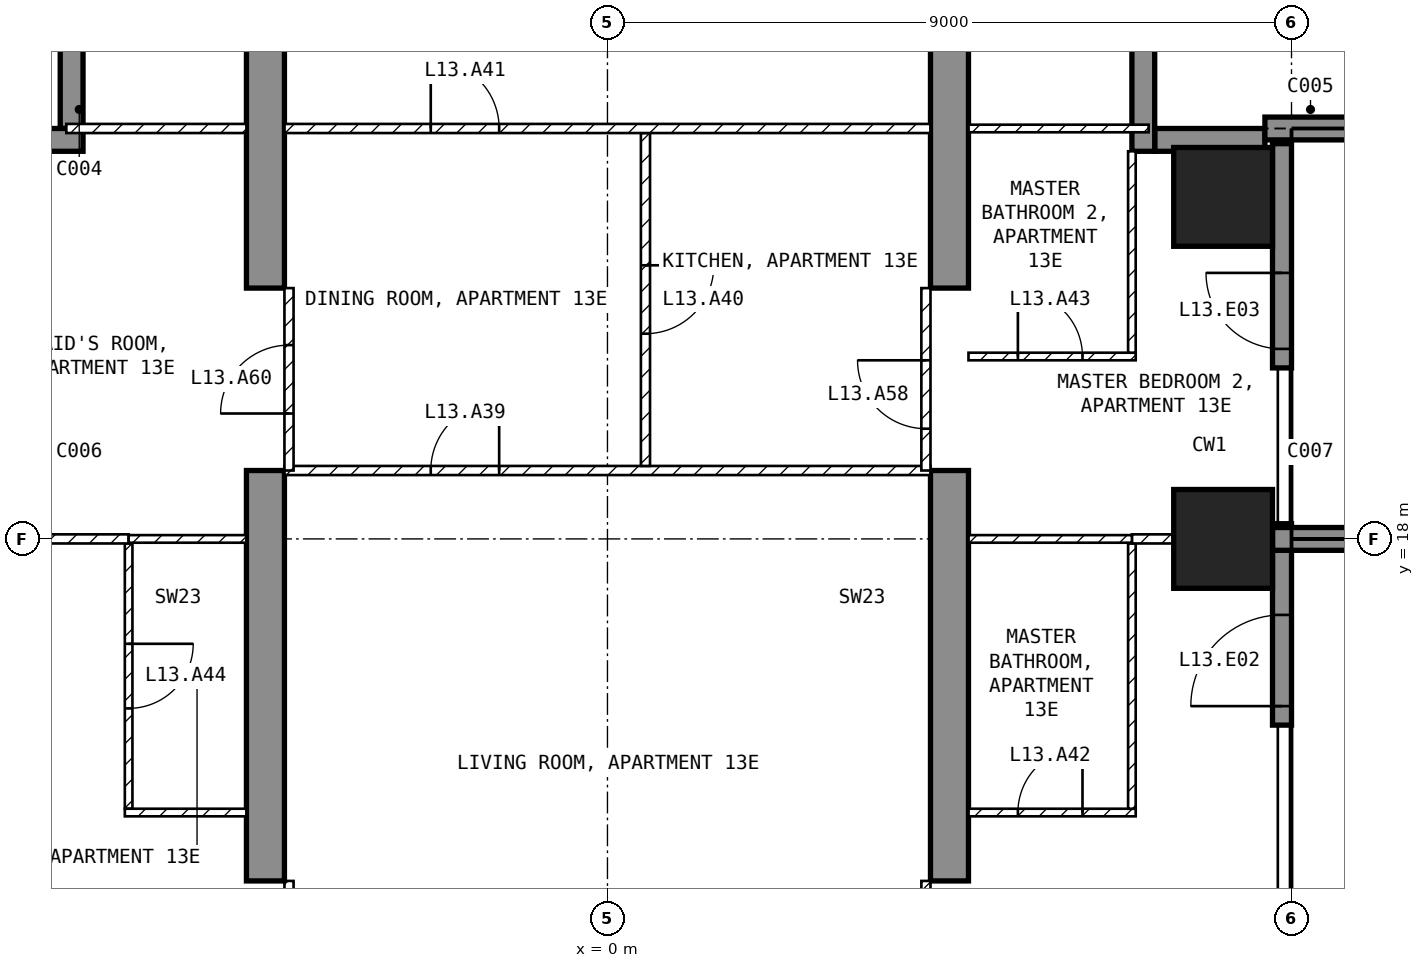
"""IFC4 building model, lengths in metres.
Left out: names, types, materials, properties, quantities, classifications, styles, units other than length and angle.
Written with IfcOpenShell. Run it as: python <this file> out.ifc"""

import sys

from ifc_helpers import new_model, si_unit, direction, frame, frame_2d, origin, origin_2d, place, context, subcontext, project, spatial, polyline, rectangle, outline, extrude, element, fill, save


model = new_model("IFC4")
c1 = context("Model", 3, precision=1e-05, world=origin(), true_north=direction((0.0, 1.0)))
c2 = subcontext(c1, "Body", "Model", "MODEL_VIEW")
j1 = project(units=[si_unit("LENGTHUNIT", "METRE"), si_unit("PLANEANGLEUNIT", "RADIAN")], contexts=[c1])
p1 = place(None, origin())
s1 = spatial("IfcSite", under=j1, at=p1, CompositionType="ELEMENT")
p2 = place(p1, origin())
s2 = spatial("IfcBuilding", under=s1, at=p2, CompositionType="ELEMENT")
p3 = place(p2, frame((0.0, 0.0, 64.5)))
s3 = spatial("IfcBuildingStorey", under=s2, at=p3, CompositionType="ELEMENT", Elevation=64.5)
for number, where, z_axis, x_axis in (
    (1, (8.1, 18.0, -0.25), (0.0, 0.0, 1.0), (1.0, 0.0, 0.0)),
    (2, (8.1, 22.5, -0.25), (0.0, 0.0, 1.0), (1.0, 0.0, 0.0)),
):
    element("IfcColumn", number, at=place(p3, frame(where, z_axis=z_axis, x_axis=x_axis)), inside=s3, PredefinedType="COLUMN", context=c2, shape_type="SweptSolid", body=[
        extrude(rectangle(XDim=1.3, YDim=1.3, at=origin_2d()), origin(), (0.0, 0.0, 1.0), 3.5),
    ])
for number, where, z_axis, x_axis in (
    (3, (-4.75, 9.0, -0.25), (1.0, 0.0, 0.0), (0.0, 1.0, 0.0)),
    (4, (4.25, 9.0, -0.25), (1.0, 0.0, 0.0), (0.0, 1.0, 0.0)),
):
    element("IfcWall", number, at=place(p3, frame(where, z_axis=z_axis, x_axis=x_axis)), inside=s3, PredefinedType="SHEAR", context=c2, shape_type="SweptSolid", body=[
        extrude(outline(polyline([(0.0, 0.0), (2.1, 0.0), (2.1, 2.65), (4.5, 2.65), (4.5, 0.0), (9.9, 0.0), (9.9, 2.65), (12.3, 2.65), (12.3, 0.0), (16.45, 0.0), (16.45, 3.5), (0.0, 3.5), (0.0, 0.0)])), origin(), (0.0, 0.0, 1.0), 0.5),
    ])
p4 = place(p3, frame((8.875, 15.55, 0.0), z_axis=(0.0, 0.0, 1.0), x_axis=(0.0, 1.0, 0.0)))
e5 = element("IfcWall", 5, at=p4, inside=s3, PredefinedType="SOLIDWALL", context=c2, shape_type="SweptSolid", body=[
    extrude(rectangle(XDim=2.65, YDim=0.25, at=frame_2d((1.325, 0.0))), origin(), (0.0, 0.0, 1.0), 3.25),
])
p5 = place(p4, frame((0.25, 0.0, 0.0)))
e6 = element("IfcOpeningElement", 6, at=p5, cuts=e5, PredefinedType="OPENING", context=c2, shape_type="SweptSolid", body=[
    extrude(rectangle(XDim=1.2, YDim=2.4, at=frame_2d((0.6, 1.2))), frame((0.0, 0.135, 0.0), z_axis=(0.0, -1.0, 0.0), x_axis=(1.0, 0.0, 0.0)), (0.0, 0.0, 1.0), 0.27),
])
p6 = place(p3, frame((8.875, 20.25, 0.0), z_axis=(0.0, 0.0, 1.0), x_axis=(0.0, 1.0, 0.0)))
e7 = element("IfcWall", 7, at=p6, inside=s3, PredefinedType="SOLIDWALL", context=c2, shape_type="SweptSolid", body=[
    extrude(rectangle(XDim=2.95, YDim=0.25, at=frame_2d((1.475, 0.0))), origin(), (0.0, 0.0, 1.0), 3.25),
])
p7 = place(p6, frame((0.25, 0.0, 0.0)))
e8 = element("IfcOpeningElement", 8, at=p7, cuts=e7, PredefinedType="OPENING", context=c2, shape_type="SweptSolid", body=[
    extrude(rectangle(XDim=1.0, YDim=2.4, at=frame_2d((0.5, 1.2))), frame((0.0, 0.135, 0.0), z_axis=(0.0, -1.0, 0.0), x_axis=(1.0, 0.0, 0.0)), (0.0, 0.0, 1.0), 0.27),
])
p8 = place(p3, frame((8.65, 23.25, 0.0), z_axis=(0.0, 0.0, 1.0), x_axis=(-1.0, 0.0, 0.0)))
e9 = element("IfcWall", 9, at=p8, inside=s3, PredefinedType="SOLIDWALL", context=c2, shape_type="SweptSolid", body=[
    extrude(rectangle(XDim=1.45, YDim=0.3, at=frame_2d((0.725, 0.0))), origin(), (0.0, 0.0, 1.0), 3.25),
])
p9 = place(p3, frame((7.05, 23.1, 0.0), z_axis=(0.0, 0.0, 1.0), x_axis=(0.0, 1.0, 0.0)))
e10 = element("IfcWall", 10, at=p9, inside=s3, PredefinedType="SOLIDWALL", context=c2, shape_type="SweptSolid", body=[
    extrude(rectangle(XDim=1.8, YDim=0.3, at=frame_2d((0.9, 0.0))), origin(), (0.0, 0.0, 1.0), 3.25),
])
p10 = place(p3, frame((-7.05, 25.2, 0.0), z_axis=(0.0, 0.0, 1.0), x_axis=(0.0, -1.0, 0.0)))
e11 = element("IfcWall", 11, at=p10, inside=s3, PredefinedType="SOLIDWALL", context=c2, shape_type="SweptSolid", body=[
    extrude(rectangle(XDim=1.8, YDim=0.3, at=frame_2d((0.9, 0.0))), origin(), (0.0, 0.0, 1.0), 3.25),
])
p11 = place(p3, frame((-6.9, 23.25, 0.0), z_axis=(0.0, 0.0, 1.0), x_axis=(-1.0, 0.0, 0.0)))
e12 = element("IfcWall", 12, at=p11, inside=s3, PredefinedType="SOLIDWALL", context=c2, shape_type="SweptSolid", body=[
    extrude(rectangle(XDim=1.75, YDim=0.3, at=frame_2d((0.875, 0.0))), origin(), (0.0, 0.0, 1.0), 3.25),
])
p12 = place(p3, frame((8.75, 18.0, 0.0), z_axis=(0.0, 0.0, 1.0), x_axis=(1.0, 0.0, 0.0)))
e13 = element("IfcWall", 13, at=p12, inside=s3, PredefinedType="SOLIDWALL", context=c2, shape_type="SweptSolid", body=[
    extrude(rectangle(XDim=2.95, YDim=0.3, at=frame_2d((1.475, 0.0))), origin(), (0.0, 0.0, 1.0), 3.25),
])
p13 = place(p3, frame((8.65, 23.4, 0.0), z_axis=(0.0, 0.0, 1.0), x_axis=(1.0, 0.0, 0.0)))
e14 = element("IfcWall", 14, at=p13, inside=s3, PredefinedType="SOLIDWALL", context=c2, shape_type="SweptSolid", body=[
    extrude(rectangle(XDim=3.05, YDim=0.3, at=frame_2d((1.525, 0.0))), origin(), (0.0, 0.0, 1.0), 3.25),
])
p14 = place(p3, frame((-4.25, 18.9, 0.0), z_axis=(0.0, 0.0, 1.0), x_axis=(1.0, 0.0, 0.0)))
e15 = element("IfcWall", 15, at=p14, inside=s3, PredefinedType="PARTITIONING", context=c2, shape_type="SweptSolid", body=[
    extrude(rectangle(XDim=8.5, YDim=0.12, at=frame_2d((4.25, 0.0))), origin(), (0.0, 0.0, 1.0), 3.25),
])
p15 = place(p14, frame((1.925, 0.0, 0.0)))
e16 = element("IfcOpeningElement", 16, at=p15, cuts=e15, PredefinedType="OPENING", context=c2, shape_type="SweptSolid", body=[
    extrude(rectangle(XDim=0.9, YDim=2.1, at=frame_2d((0.45, 1.05))), frame((0.0, 0.07, 0.0), z_axis=(0.0, -1.0, 0.0), x_axis=(1.0, 0.0, 0.0)), (0.0, 0.0, 1.0), 0.14),
])
p16 = place(p3, frame((0.5, 23.34, 0.0), z_axis=(0.0, 0.0, 1.0), x_axis=(0.0, -1.0, 0.0)))
e17 = element("IfcWall", 17, at=p16, inside=s3, PredefinedType="PARTITIONING", context=c2, shape_type="SweptSolid", body=[
    extrude(rectangle(XDim=4.38, YDim=0.12, at=frame_2d((2.19, 0.0))), origin(), (0.0, 0.0, 1.0), 3.25),
])
p17 = place(p16, frame((1.74, 0.0, 0.0)))
e18 = element("IfcOpeningElement", 18, at=p17, cuts=e17, PredefinedType="OPENING", context=c2, shape_type="SweptSolid", body=[
    extrude(rectangle(XDim=0.9, YDim=2.1, at=frame_2d((0.45, 1.05))), frame((0.0, 0.07, 0.0), z_axis=(0.0, -1.0, 0.0), x_axis=(1.0, 0.0, 0.0)), (0.0, 0.0, 1.0), 0.14),
])
p18 = place(p3, frame((-4.25, 23.4, 0.0), z_axis=(0.0, 0.0, 1.0), x_axis=(1.0, 0.0, 0.0)))
e19 = element("IfcWall", 19, at=p18, inside=s3, PredefinedType="PARTITIONING", context=c2, shape_type="SweptSolid", body=[
    extrude(rectangle(XDim=8.5, YDim=0.12, at=frame_2d((4.25, 0.0))), origin(), (0.0, 0.0, 1.0), 3.25),
])
p19 = place(p18, frame((1.925, 0.0, 0.0)))
e20 = element("IfcOpeningElement", 20, at=p19, cuts=e19, PredefinedType="OPENING", context=c2, shape_type="SweptSolid", body=[
    extrude(rectangle(XDim=0.9, YDim=2.1, at=frame_2d((0.45, 1.05))), frame((0.0, 0.07, 0.0), z_axis=(0.0, -1.0, 0.0), x_axis=(1.0, 0.0, 0.0)), (0.0, 0.0, 1.0), 0.14),
])
p20 = place(p3, frame((4.75, 14.4, 0.0), z_axis=(0.0, 0.0, 1.0), x_axis=(1.0, 0.0, 0.0)))
e21 = element("IfcWall", 21, at=p20, inside=s3, PredefinedType="PARTITIONING", context=c2, shape_type="SweptSolid", body=[
    extrude(rectangle(XDim=2.2, YDim=0.1, at=frame_2d((1.1, 0.0))), origin(), (0.0, 0.0, 1.0), 3.25),
])
p21 = place(p20, frame((0.65, 0.0, 0.0)))
e22 = element("IfcOpeningElement", 22, at=p21, cuts=e21, PredefinedType="OPENING", context=c2, shape_type="SweptSolid", body=[
    extrude(rectangle(XDim=0.85, YDim=2.1, at=frame_2d((0.425, 1.05))), frame((0.0, 0.06, 0.0), z_axis=(0.0, -1.0, 0.0), x_axis=(1.0, 0.0, 0.0)), (0.0, 0.0, 1.0), 0.12),
])
p22 = place(p3, frame((6.9, 14.45, 0.0), z_axis=(0.0, 0.0, 1.0), x_axis=(0.0, 1.0, 0.0)))
e23 = element("IfcWall", 23, at=p22, inside=s3, PredefinedType="PARTITIONING", context=c2, shape_type="SweptSolid", body=[
    extrude(rectangle(XDim=3.49, YDim=0.1, at=frame_2d((1.745, 0.0))), origin(), (0.0, 0.0, 1.0), 3.25),
])
p23 = place(p3, frame((6.9, 18.0, 0.0), z_axis=(0.0, 0.0, 1.0), x_axis=(1.0, 0.0, 0.0)))
e24 = element("IfcWall", 24, at=p23, inside=s3, PredefinedType="PARTITIONING", context=c2, shape_type="SweptSolid", body=[
    extrude(rectangle(XDim=0.55, YDim=0.12, at=frame_2d((0.275, 0.0))), origin(), (0.0, 0.0, 1.0), 2.346),
])
p24 = place(p3, frame((4.75, 18.0, 0.0), z_axis=(0.0, 0.0, 1.0), x_axis=(1.0, 0.0, 0.0)))
e25 = element("IfcWall", 25, at=p24, inside=s3, PredefinedType="PARTITIONING", context=c2, shape_type="SweptSolid", body=[
    extrude(rectangle(XDim=2.15, YDim=0.1, at=frame_2d((1.075, 0.0))), origin(), (0.0, 0.0, 1.0), 2.346),
])
p25 = place(p3, frame((4.75, 20.4, 0.0), z_axis=(0.0, 0.0, 1.0), x_axis=(1.0, 0.0, 0.0)))
e26 = element("IfcWall", 26, at=p25, inside=s3, PredefinedType="PARTITIONING", context=c2, shape_type="SweptSolid", body=[
    extrude(rectangle(XDim=2.2, YDim=0.1, at=frame_2d((1.1, 0.0))), origin(), (0.0, 0.0, 1.0), 3.25),
])
p26 = place(p25, frame((0.65, 0.0, 0.0)))
e27 = element("IfcOpeningElement", 27, at=p26, cuts=e26, PredefinedType="OPENING", context=c2, shape_type="SweptSolid", body=[
    extrude(rectangle(XDim=0.85, YDim=2.1, at=frame_2d((0.425, 1.05))), frame((0.0, 0.06, 0.0), z_axis=(0.0, -1.0, 0.0), x_axis=(1.0, 0.0, 0.0)), (0.0, 0.0, 1.0), 0.12),
])
p27 = place(p3, frame((6.9, 20.45, 0.0), z_axis=(0.0, 0.0, 1.0), x_axis=(0.0, 1.0, 0.0)))
e28 = element("IfcWall", 28, at=p27, inside=s3, PredefinedType="PARTITIONING", context=c2, shape_type="SweptSolid", body=[
    extrude(rectangle(XDim=2.65, YDim=0.1, at=frame_2d((1.325, 0.0))), origin(), (0.0, 0.0, 1.0), 3.25),
])
p28 = place(p3, frame((4.75, 23.4, 0.0), z_axis=(0.0, 0.0, 1.0), x_axis=(1.0, 0.0, 0.0)))
e29 = element("IfcWall", 29, at=p28, inside=s3, PredefinedType="PARTITIONING", context=c2, shape_type="SweptSolid", body=[
    extrude(rectangle(XDim=2.37, YDim=0.1, at=frame_2d((1.185, 0.0))), origin(), (0.0, 0.0, 1.0), 3.25),
])
p29 = place(p3, frame((-6.3, 17.94, 0.0), z_axis=(0.0, 0.0, 1.0), x_axis=(0.0, -1.0, 0.0)))
e30 = element("IfcWall", 30, at=p29, inside=s3, PredefinedType="PARTITIONING", context=c2, shape_type="SweptSolid", body=[
    extrude(rectangle(XDim=3.49, YDim=0.1, at=frame_2d((1.745, 0.0))), origin(), (0.0, 0.0, 1.0), 3.25),
])
p30 = place(p29, frame((1.32, 0.0, 0.0)))
e31 = element("IfcOpeningElement", 31, at=p30, cuts=e30, PredefinedType="OPENING", context=c2, shape_type="SweptSolid", body=[
    extrude(rectangle(XDim=0.85, YDim=2.1, at=frame_2d((0.425, 1.05))), frame((0.0, 0.06, 0.0), z_axis=(0.0, -1.0, 0.0), x_axis=(1.0, 0.0, 0.0)), (0.0, 0.0, 1.0), 0.12),
])
p31 = place(p3, frame((-6.35, 14.4, 0.0), z_axis=(0.0, 0.0, 1.0), x_axis=(1.0, 0.0, 0.0)))
e32 = element("IfcWall", 32, at=p31, inside=s3, PredefinedType="PARTITIONING", context=c2, shape_type="SweptSolid", body=[
    extrude(rectangle(XDim=1.6, YDim=0.1, at=frame_2d((0.8, 0.0))), origin(), (0.0, 0.0, 1.0), 3.25),
])
p32 = place(p3, frame((-7.45, 18.0, 0.0), z_axis=(0.0, 0.0, 1.0), x_axis=(1.0, 0.0, 0.0)))
e33 = element("IfcWall", 33, at=p32, inside=s3, PredefinedType="PARTITIONING", context=c2, shape_type="SweptSolid", body=[
    extrude(rectangle(XDim=1.15, YDim=0.12, at=frame_2d((0.575, 0.0))), origin(), (0.0, 0.0, 1.0), 2.346),
])
p33 = place(p3, frame((-6.3, 18.0, 0.0), z_axis=(0.0, 0.0, 1.0), x_axis=(1.0, 0.0, 0.0)))
e34 = element("IfcWall", 34, at=p33, inside=s3, PredefinedType="PARTITIONING", context=c2, shape_type="SweptSolid", body=[
    extrude(rectangle(XDim=1.55, YDim=0.1, at=frame_2d((0.775, 0.0))), origin(), (0.0, 0.0, 1.0), 2.346),
])
p34 = place(p3, frame((-7.12, 23.4, 0.0), z_axis=(0.0, 0.0, 1.0), x_axis=(1.0, 0.0, 0.0)))
e35 = element("IfcWall", 35, at=p34, inside=s3, PredefinedType="PARTITIONING", context=c2, shape_type="SweptSolid", body=[
    extrude(rectangle(XDim=2.37, YDim=0.12, at=frame_2d((1.185, 0.0))), origin(), (0.0, 0.0, 1.0), 3.25),
])
p35 = place(p3, frame((4.19, 11.1, 0.0), z_axis=(0.0, 0.0, 1.0), x_axis=(0.0, 1.0, 0.0)))
e36 = element("IfcWall", 36, at=p35, inside=s3, PredefinedType="PARTITIONING", context=c2, shape_type="SweptSolid", body=[
    extrude(rectangle(XDim=2.4, YDim=0.12, at=frame_2d((1.2, 0.0))), origin(), (0.0, 0.0, 1.0), 2.4),
])
p36 = place(p35, frame((0.75, 0.0, 0.0)))
e37 = element("IfcOpeningElement", 37, at=p36, cuts=e36, PredefinedType="OPENING", context=c2, shape_type="SweptSolid", body=[
    extrude(rectangle(XDim=0.9, YDim=2.1, at=frame_2d((0.45, 1.05))), frame((0.0, 0.07, 0.0), z_axis=(0.0, -1.0, 0.0), x_axis=(1.0, 0.0, 0.0)), (0.0, 0.0, 1.0), 0.14),
])
p37 = place(p3, frame((4.19, 18.9, 0.0), z_axis=(0.0, 0.0, 1.0), x_axis=(0.0, 1.0, 0.0)))
e38 = element("IfcWall", 38, at=p37, inside=s3, PredefinedType="PARTITIONING", context=c2, shape_type="SweptSolid", body=[
    extrude(rectangle(XDim=2.4, YDim=0.12, at=frame_2d((1.2, 0.0))), origin(), (0.0, 0.0, 1.0), 2.4),
])
p38 = place(p37, frame((0.55, 0.0, 0.0)))
e39 = element("IfcOpeningElement", 39, at=p38, cuts=e38, PredefinedType="OPENING", context=c2, shape_type="SweptSolid", body=[
    extrude(rectangle(XDim=0.9, YDim=2.1, at=frame_2d((0.45, 1.05))), frame((0.0, 0.07, 0.0), z_axis=(0.0, -1.0, 0.0), x_axis=(1.0, 0.0, 0.0)), (0.0, 0.0, 1.0), 0.14),
])
p39 = place(p3, frame((-4.19, 11.1, 0.0), z_axis=(0.0, 0.0, 1.0), x_axis=(0.0, 1.0, 0.0)))
e40 = element("IfcWall", 40, at=p39, inside=s3, PredefinedType="PARTITIONING", context=c2, shape_type="SweptSolid", body=[
    extrude(rectangle(XDim=2.4, YDim=0.12, at=frame_2d((1.2, 0.0))), origin(), (0.0, 0.0, 1.0), 2.4),
])
p40 = place(p39, frame((0.75, 0.0, 0.0)))
e41 = element("IfcOpeningElement", 41, at=p40, cuts=e40, PredefinedType="OPENING", context=c2, shape_type="SweptSolid", body=[
    extrude(rectangle(XDim=0.9, YDim=2.1, at=frame_2d((0.45, 1.05))), frame((0.0, 0.07, 0.0), z_axis=(0.0, -1.0, 0.0), x_axis=(1.0, 0.0, 0.0)), (0.0, 0.0, 1.0), 0.14),
])
p41 = place(p3, frame((-4.19, 18.9, 0.0), z_axis=(0.0, 0.0, 1.0), x_axis=(0.0, 1.0, 0.0)))
e42 = element("IfcWall", 42, at=p41, inside=s3, PredefinedType="PARTITIONING", context=c2, shape_type="SweptSolid", body=[
    extrude(rectangle(XDim=2.4, YDim=0.12, at=frame_2d((1.2, 0.0))), origin(), (0.0, 0.0, 1.0), 2.4),
])
p42 = place(p41, frame((0.75, 0.0, 0.0)))
e43 = element("IfcOpeningElement", 43, at=p42, cuts=e42, PredefinedType="OPENING", context=c2, shape_type="SweptSolid", body=[
    extrude(rectangle(XDim=0.9, YDim=2.1, at=frame_2d((0.45, 1.05))), frame((0.0, 0.07, 0.0), z_axis=(0.0, -1.0, 0.0), x_axis=(1.0, 0.0, 0.0)), (0.0, 0.0, 1.0), 0.14),
])
p43 = place(p5, origin())
e44 = element("IfcDoor", 44, at=p43, inside=s3, OperationType="SINGLE_SWING_LEFT", PredefinedType="DOOR", context=c2, shape_type="SweptSolid", body=[
    extrude(rectangle(XDim=1.2, YDim=2.4, at=frame_2d((0.6, 1.2))), frame((0.0, 0.025, 0.0), z_axis=(0.0, -1.0, 0.0), x_axis=(1.0, 0.0, 0.0)), (0.0, 0.0, 1.0), 0.05),
])
fill(e6, e44)
p44 = place(p7, origin())
e45 = element("IfcDoor", 45, at=p44, inside=s3, OperationType="SINGLE_SWING_RIGHT", PredefinedType="DOOR", context=c2, shape_type="SweptSolid", body=[
    extrude(rectangle(XDim=1.0, YDim=2.4, at=frame_2d((0.5, 1.2))), frame((0.0, 0.025, 0.0), z_axis=(0.0, -1.0, 0.0), x_axis=(1.0, 0.0, 0.0)), (0.0, 0.0, 1.0), 0.05),
])
fill(e8, e45)
p45 = place(p15, origin())
e46 = element("IfcDoor", 46, at=p45, inside=s3, OperationType="SINGLE_SWING_RIGHT", PredefinedType="DOOR", context=c2, shape_type="SweptSolid", body=[
    extrude(rectangle(XDim=0.9, YDim=2.1, at=frame_2d((0.45, 1.05))), frame((0.0, 0.025, 0.0), z_axis=(0.0, -1.0, 0.0), x_axis=(1.0, 0.0, 0.0)), (0.0, 0.0, 1.0), 0.05),
])
fill(e16, e46)
p46 = place(p17, origin())
e47 = element("IfcDoor", 47, at=p46, inside=s3, OperationType="SINGLE_SWING_LEFT", PredefinedType="DOOR", context=c2, shape_type="SweptSolid", body=[
    extrude(rectangle(XDim=0.9, YDim=2.1, at=frame_2d((0.45, 1.05))), frame((0.0, 0.025, 0.0), z_axis=(0.0, -1.0, 0.0), x_axis=(1.0, 0.0, 0.0)), (0.0, 0.0, 1.0), 0.05),
])
fill(e18, e47)
p47 = place(p19, origin())
e48 = element("IfcDoor", 48, at=p47, inside=s3, OperationType="SINGLE_SWING_LEFT", PredefinedType="DOOR", context=c2, shape_type="SweptSolid", body=[
    extrude(rectangle(XDim=0.9, YDim=2.1, at=frame_2d((0.45, 1.05))), frame((0.0, 0.025, 0.0), z_axis=(0.0, -1.0, 0.0), x_axis=(1.0, 0.0, 0.0)), (0.0, 0.0, 1.0), 0.05),
])
fill(e20, e48)
p48 = place(p21, origin())
e49 = element("IfcDoor", 49, at=p48, inside=s3, OperationType="SINGLE_SWING_RIGHT", PredefinedType="DOOR", context=c2, shape_type="SweptSolid", body=[
    extrude(rectangle(XDim=0.85, YDim=2.1, at=frame_2d((0.425, 1.05))), frame((0.0, 0.025, 0.0), z_axis=(0.0, -1.0, 0.0), x_axis=(1.0, 0.0, 0.0)), (0.0, 0.0, 1.0), 0.05),
])
fill(e22, e49)
p49 = place(p26, origin())
e50 = element("IfcDoor", 50, at=p49, inside=s3, OperationType="SINGLE_SWING_LEFT", PredefinedType="DOOR", context=c2, shape_type="SweptSolid", body=[
    extrude(rectangle(XDim=0.85, YDim=2.1, at=frame_2d((0.425, 1.05))), frame((0.0, 0.025, 0.0), z_axis=(0.0, -1.0, 0.0), x_axis=(1.0, 0.0, 0.0)), (0.0, 0.0, 1.0), 0.05),
])
fill(e27, e50)
p50 = place(p30, origin())
e51 = element("IfcDoor", 51, at=p50, inside=s3, OperationType="SINGLE_SWING_LEFT", PredefinedType="DOOR", context=c2, shape_type="SweptSolid", body=[
    extrude(rectangle(XDim=0.85, YDim=2.1, at=frame_2d((0.425, 1.05))), frame((0.0, 0.025, 0.0), z_axis=(0.0, -1.0, 0.0), x_axis=(1.0, 0.0, 0.0)), (0.0, 0.0, 1.0), 0.05),
])
fill(e31, e51)
p51 = place(p38, origin())
e52 = element("IfcDoor", 52, at=p51, inside=s3, OperationType="SINGLE_SWING_RIGHT", PredefinedType="DOOR", context=c2, shape_type="SweptSolid", body=[
    extrude(rectangle(XDim=0.9, YDim=2.1, at=frame_2d((0.45, 1.05))), frame((0.0, 0.025, 0.0), z_axis=(0.0, -1.0, 0.0), x_axis=(1.0, 0.0, 0.0)), (0.0, 0.0, 1.0), 0.05),
])
fill(e39, e52)
p52 = place(p42, origin())
e53 = element("IfcDoor", 53, at=p52, inside=s3, OperationType="SINGLE_SWING_LEFT", PredefinedType="DOOR", context=c2, shape_type="SweptSolid", body=[
    extrude(rectangle(XDim=0.9, YDim=2.1, at=frame_2d((0.45, 1.05))), frame((0.0, 0.025, 0.0), z_axis=(0.0, -1.0, 0.0), x_axis=(1.0, 0.0, 0.0)), (0.0, 0.0, 1.0), 0.05),
])
fill(e43, e53)
save(model, sys.argv[1])
